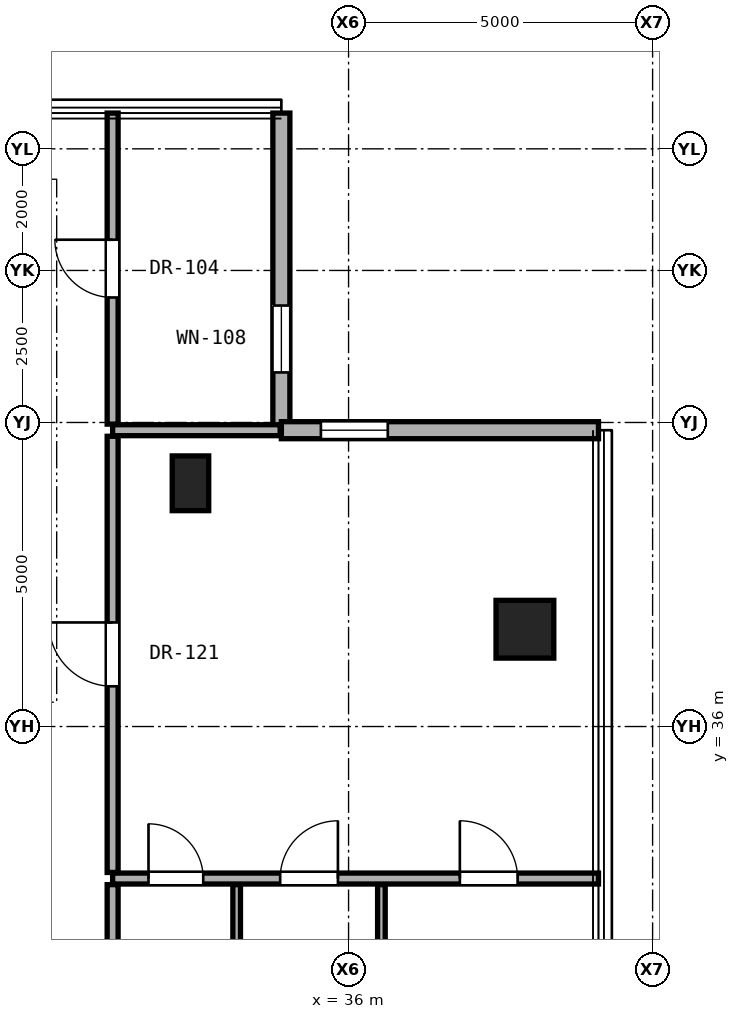
"""IFC4 building model, lengths in metres.
Left out: names, types, materials, properties, quantities, classifications, styles, units other than length and angle.
Written with IfcOpenShell. Run it as: python <this file> out.ifc"""

import sys

from ifc_helpers import new_model, si_unit, direction, frame, frame_2d, origin, origin_2d, place, context, subcontext, project, spatial, rectangle, hollow_rectangle, extrude, element, fill, save


model = new_model("IFC4")
c1 = context("Model", 3, precision=1e-05, world=origin(), true_north=direction((0.0, 1.0)))
c2 = subcontext(c1, "Body", "Model", "MODEL_VIEW")
j1 = project(units=[si_unit("LENGTHUNIT", "METRE"), si_unit("PLANEANGLEUNIT", "RADIAN")], contexts=[c1])
p1 = place(None, origin())
s1 = spatial("IfcSite", under=j1, at=p1, CompositionType="ELEMENT")
p2 = place(p1, origin())
s2 = spatial("IfcBuilding", under=s1, at=p2, CompositionType="ELEMENT")
p3 = place(p2, frame((0.0, 0.0, 186.9)))
s3 = spatial("IfcBuildingStorey", under=s2, at=p3, CompositionType="ELEMENT", Elevation=186.9)
p4 = place(p3, frame((38.9, 37.6, 0.0), z_axis=(0.0, 0.0, 1.0), x_axis=(1.0, 0.0, 0.0)))
e1 = element("IfcColumn", 1, at=p4, inside=s3, PredefinedType="COLUMN", context=c2, shape_type="SweptSolid", body=[
    extrude(hollow_rectangle(XDim=0.95, YDim=0.95, WallThickness=0.05, at=origin_2d()), origin(), (0.0, 0.0, 1.0), 3.25),
])
p5 = place(p3, frame((33.4, 40.0, 0.0), z_axis=(0.0, 0.0, 1.0), x_axis=(1.0, 0.0, 0.0)))
e2 = element("IfcColumn", 2, at=p5, inside=s3, PredefinedType="PILASTER", context=c2, shape_type="SweptSolid", body=[
    extrude(rectangle(XDim=0.6, YDim=0.9, at=origin_2d()), origin(), (0.0, 0.0, 1.0), 3.25),
])
p6 = place(p3, frame((34.895, 40.873, 0.0), z_axis=(0.0, 0.0, 1.0), x_axis=(0.0, 1.0, 0.0)))
e3 = element("IfcWall", 3, at=p6, inside=s3, PredefinedType="SOLIDWALL", context=c2, shape_type="SweptSolid", body=[
    extrude(rectangle(XDim=5.215, YDim=0.28, at=frame_2d((2.607, 0.0))), origin(), (0.0, 0.0, 1.0), 3.03),
])
p7 = place(p6, frame((0.95, 0.0, 0.85)))
e4 = element("IfcOpeningElement", 4, at=p7, cuts=e3, PredefinedType="OPENING", context=c2, shape_type="SweptSolid", body=[
    extrude(rectangle(XDim=1.1, YDim=2.0, at=frame_2d((0.55, 1.0))), frame((0.0, 0.15, 0.0), z_axis=(0.0, -1.0, 0.0), x_axis=(1.0, 0.0, 0.0)), (0.0, 0.0, 1.0), 0.3),
])
p8 = place(p3, frame((40.11, 40.873, 0.0), z_axis=(0.0, 0.0, 1.0), x_axis=(-1.0, 0.0, 0.0)))
e5 = element("IfcWall", 5, at=p8, inside=s3, PredefinedType="SOLIDWALL", context=c2, shape_type="SweptSolid", body=[
    extrude(rectangle(XDim=5.215, YDim=0.28, at=frame_2d((2.607, 0.0))), origin(), (0.0, 0.0, 1.0), 3.03),
])
p9 = place(p8, frame((3.465, 0.0, 0.85)))
e6 = element("IfcOpeningElement", 6, at=p9, cuts=e5, PredefinedType="OPENING", context=c2, shape_type="SweptSolid", body=[
    extrude(rectangle(XDim=1.1, YDim=2.0, at=frame_2d((0.55, 1.0))), frame((0.0, 0.15, 0.0), z_axis=(0.0, -1.0, 0.0), x_axis=(1.0, 0.0, 0.0)), (0.0, 0.0, 1.0), 0.3),
])
p10 = place(p3, frame((32.12, 33.5, 0.0), z_axis=(0.0, 0.0, 1.0), x_axis=(1.0, 0.0, 0.0)))
e7 = element("IfcWall", 7, at=p10, inside=s3, PredefinedType="PARTITIONING", context=c2, shape_type="SweptSolid", body=[
    extrude(rectangle(XDim=7.99, YDim=0.18, at=frame_2d((3.995, 0.0))), origin(), (0.0, 0.0, 1.0), 2.269),
])
p11 = place(p10, frame((5.71, 0.0, 0.0)))
e8 = element("IfcOpeningElement", 8, at=p11, cuts=e7, PredefinedType="OPENING", context=c2, shape_type="SweptSolid", body=[
    extrude(rectangle(XDim=0.95, YDim=2.15, at=frame_2d((0.475, 1.075))), frame((0.0, 0.1, 0.0), z_axis=(0.0, -1.0, 0.0), x_axis=(1.0, 0.0, 0.0)), (0.0, 0.0, 1.0), 0.2),
])
p12 = place(p10, frame((2.755, 0.0, 0.0)))
e9 = element("IfcOpeningElement", 9, at=p12, cuts=e7, PredefinedType="OPENING", context=c2, shape_type="SweptSolid", body=[
    extrude(rectangle(XDim=0.95, YDim=2.15, at=frame_2d((0.475, 1.075))), frame((0.0, 0.1, 0.0), z_axis=(0.0, -1.0, 0.0), x_axis=(1.0, 0.0, 0.0)), (0.0, 0.0, 1.0), 0.2),
])
p13 = place(p10, frame((0.59, 0.0, 0.0)))
e10 = element("IfcOpeningElement", 10, at=p13, cuts=e7, PredefinedType="OPENING", context=c2, shape_type="SweptSolid", body=[
    extrude(rectangle(XDim=0.9, YDim=2.1, at=frame_2d((0.45, 1.05))), frame((0.0, 0.1, 0.0), z_axis=(0.0, -1.0, 0.0), x_axis=(1.0, 0.0, 0.0)), (0.0, 0.0, 1.0), 0.2),
])
p14 = place(p3, frame((32.12, 40.873, 0.0), z_axis=(0.0, 0.0, 1.0), x_axis=(1.0, 0.0, 0.0)))
e11 = element("IfcWall", 11, at=p14, inside=s3, PredefinedType="PARTITIONING", context=c2, shape_type="SweptSolid", body=[
    extrude(rectangle(XDim=2.755, YDim=0.18, at=frame_2d((1.377, 0.0))), origin(), (0.0, 0.0, 1.0), 3.05),
])
p15 = place(p3, frame((32.12, 31.3, 0.0), z_axis=(0.0, 0.0, 1.0), x_axis=(0.0, 1.0, 0.0)))
e12 = element("IfcWall", 12, at=p15, inside=s3, PredefinedType="PARTITIONING", context=c2, shape_type="SweptSolid", body=[
    extrude(rectangle(XDim=2.1, YDim=0.18, at=frame_2d((1.05, 0.0))), origin(), (0.0, 0.0, 1.0), 2.346),
])
p16 = place(p3, frame((32.12, 33.6, 0.0), z_axis=(0.0, 0.0, 1.0), x_axis=(0.0, 1.0, 0.0)))
e13 = element("IfcWall", 13, at=p16, inside=s3, PredefinedType="PARTITIONING", context=c2, shape_type="SweptSolid", body=[
    extrude(rectangle(XDim=7.173, YDim=0.18, at=frame_2d((3.586, 0.0))), origin(), (0.0, 0.0, 1.0), 2.442),
])
p17 = place(p16, frame((3.062, 0.0, 0.0)))
e14 = element("IfcOpeningElement", 14, at=p17, cuts=e13, PredefinedType="OPENING", context=c2, shape_type="SweptSolid", body=[
    extrude(rectangle(XDim=1.05, YDim=2.2, at=frame_2d((0.525, 1.1))), frame((0.0, 0.1, 0.0), z_axis=(0.0, -1.0, 0.0), x_axis=(1.0, 0.0, 0.0)), (0.0, 0.0, 1.0), 0.2),
])
p18 = place(p3, frame((32.12, 40.973, 0.0), z_axis=(0.0, 0.0, 1.0), x_axis=(0.0, 1.0, 0.0)))
e15 = element("IfcWall", 15, at=p18, inside=s3, PredefinedType="PARTITIONING", context=c2, shape_type="SweptSolid", body=[
    extrude(rectangle(XDim=5.115, YDim=0.18, at=frame_2d((2.558, 0.0))), origin(), (0.0, 0.0, 1.0), 3.05),
])
p19 = place(p18, frame((2.083, 0.0, 0.0)))
e16 = element("IfcOpeningElement", 16, at=p19, cuts=e15, PredefinedType="OPENING", context=c2, shape_type="SweptSolid", body=[
    extrude(rectangle(XDim=0.95, YDim=2.15, at=frame_2d((0.475, 1.075))), frame((0.0, 0.1, 0.0), z_axis=(0.0, -1.0, 0.0), x_axis=(1.0, 0.0, 0.0)), (0.0, 0.0, 1.0), 0.2),
])
for number, where, z_axis, x_axis in (
    (17, (34.16, 31.3, 0.0), (0.0, 0.0, 1.0), (0.0, 1.0, 0.0)),
    (18, (36.54, 31.3, 0.0), (0.0, 0.0, 1.0), (0.0, 1.0, 0.0)),
):
    element("IfcWall", number, at=place(p3, frame(where, z_axis=z_axis, x_axis=x_axis)), inside=s3, PredefinedType="PARTITIONING", context=c2, shape_type="SweptSolid", body=[
        extrude(rectangle(XDim=2.1, YDim=0.125, at=frame_2d((1.05, 0.0))), origin(), (0.0, 0.0, 1.0), 2.346),
    ])
p20 = place(p7, origin())
e19 = element("IfcWindow", 19, at=p20, inside=s3, PartitioningType="SINGLE_PANEL", PredefinedType="WINDOW", context=c2, shape_type="SweptSolid", body=[
    extrude(rectangle(XDim=1.1, YDim=2.0, at=frame_2d((0.55, 1.0))), frame((0.0, 0.03, 0.0), z_axis=(0.0, -1.0, 0.0), x_axis=(1.0, 0.0, 0.0)), (0.0, 0.0, 1.0), 0.06),
])
fill(e4, e19)
p21 = place(p9, origin())
e20 = element("IfcWindow", 20, at=p21, inside=s3, PartitioningType="SINGLE_PANEL", PredefinedType="WINDOW", context=c2, shape_type="SweptSolid", body=[
    extrude(rectangle(XDim=1.1, YDim=2.0, at=frame_2d((0.55, 1.0))), frame((0.0, 0.03, 0.0), z_axis=(0.0, -1.0, 0.0), x_axis=(1.0, 0.0, 0.0)), (0.0, 0.0, 1.0), 0.06),
])
fill(e6, e20)
p22 = place(p17, origin())
e21 = element("IfcDoor", 21, at=p22, inside=s3, OperationType="SINGLE_SWING_RIGHT", PredefinedType="DOOR", context=c2, shape_type="SweptSolid", body=[
    extrude(rectangle(XDim=1.05, YDim=2.2, at=frame_2d((0.525, 1.1))), frame((0.0, 0.025, 0.0), z_axis=(0.0, -1.0, 0.0), x_axis=(1.0, 0.0, 0.0)), (0.0, 0.0, 1.0), 0.05),
])
fill(e14, e21)
p23 = place(p11, origin())
e22 = element("IfcDoor", 22, at=p23, inside=s3, OperationType="SINGLE_SWING_LEFT", PredefinedType="DOOR", context=c2, shape_type="SweptSolid", body=[
    extrude(rectangle(XDim=0.95, YDim=2.15, at=frame_2d((0.475, 1.075))), frame((0.0, 0.025, 0.0), z_axis=(0.0, -1.0, 0.0), x_axis=(1.0, 0.0, 0.0)), (0.0, 0.0, 1.0), 0.05),
])
fill(e8, e22)
p24 = place(p12, origin())
e23 = element("IfcDoor", 23, at=p24, inside=s3, OperationType="SINGLE_SWING_RIGHT", PredefinedType="DOOR", context=c2, shape_type="SweptSolid", body=[
    extrude(rectangle(XDim=0.95, YDim=2.15, at=frame_2d((0.475, 1.075))), frame((0.0, 0.025, 0.0), z_axis=(0.0, -1.0, 0.0), x_axis=(1.0, 0.0, 0.0)), (0.0, 0.0, 1.0), 0.05),
])
fill(e9, e23)
p25 = place(p13, origin())
e24 = element("IfcDoor", 24, at=p25, inside=s3, OperationType="SINGLE_SWING_LEFT", PredefinedType="DOOR", context=c2, shape_type="SweptSolid", body=[
    extrude(rectangle(XDim=0.9, YDim=2.1, at=frame_2d((0.45, 1.05))), frame((0.0, 0.025, 0.0), z_axis=(0.0, -1.0, 0.0), x_axis=(1.0, 0.0, 0.0)), (0.0, 0.0, 1.0), 0.05),
])
fill(e10, e24)
p26 = place(p19, origin())
e25 = element("IfcDoor", 25, at=p26, inside=s3, OperationType="SINGLE_SWING_RIGHT", PredefinedType="DOOR", context=c2, shape_type="SweptSolid", body=[
    extrude(rectangle(XDim=0.95, YDim=2.15, at=frame_2d((0.475, 1.075))), frame((0.0, 0.025, 0.0), z_axis=(0.0, -1.0, 0.0), x_axis=(1.0, 0.0, 0.0)), (0.0, 0.0, 1.0), 0.05),
])
fill(e16, e25)
save(model, sys.argv[1])
